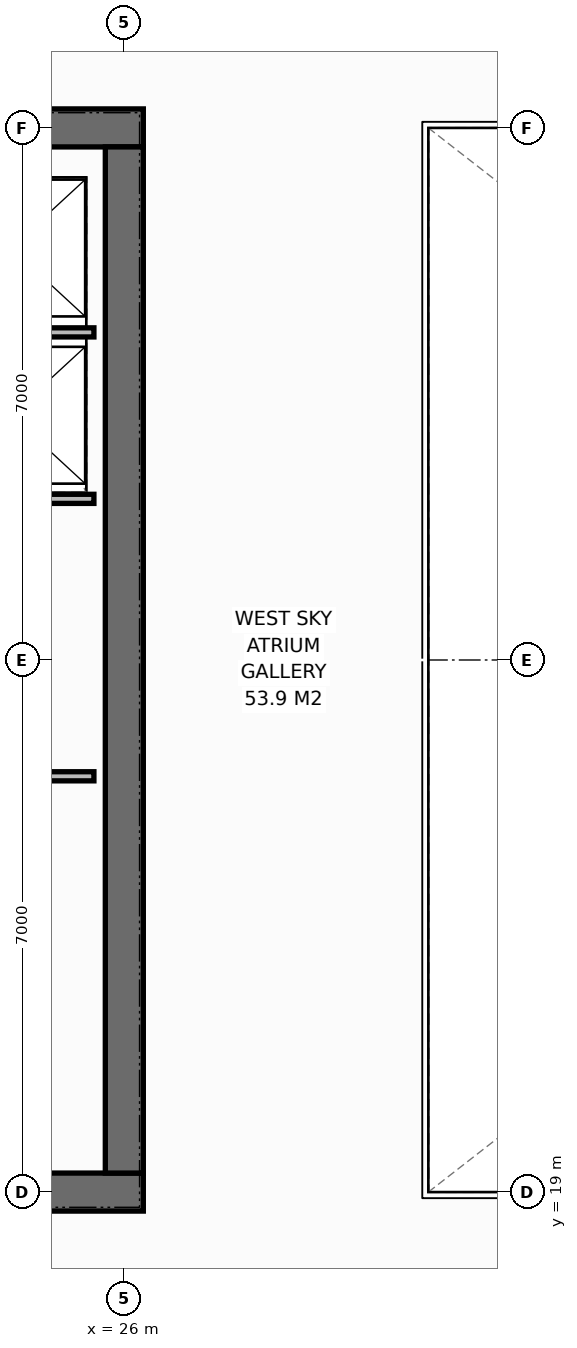
"""IFC4 building model, lengths in metres.
Left out: names, types, materials, properties, quantities, classifications, styles, units other than length and angle.
Written with IfcOpenShell. Run it as: python <this file> out.ifc"""

import sys

from ifc_helpers import new_model, si_unit, direction, frame, frame_2d, origin, place, context, subcontext, project, spatial, rectangle, extrude, element, save


model = new_model("IFC4")
c1 = context("Model", 3, precision=1e-05, world=origin(), true_north=direction((0.0, 1.0)))
c2 = subcontext(c1, "Body", "Model", "MODEL_VIEW")
j1 = project(units=[si_unit("LENGTHUNIT", "METRE"), si_unit("PLANEANGLEUNIT", "RADIAN")], contexts=[c1])
p1 = place(None, origin())
s1 = spatial("IfcSite", under=j1, at=p1, CompositionType="ELEMENT")
p2 = place(p1, origin())
s2 = spatial("IfcBuilding", under=s1, at=p2, CompositionType="ELEMENT")
p3 = place(p2, frame((0.0, 0.0, 259.4)))
s3 = spatial("IfcBuildingStorey", under=s2, at=p3, CompositionType="ELEMENT", Elevation=259.4)
p4 = place(p3, frame((12.75, 19.0, 0.0), z_axis=(0.0, 0.0, 1.0), x_axis=(1.0, 0.0, 0.0)))
e1 = element("IfcWall", 1, at=p4, inside=s3, PredefinedType="SHEAR", context=c2, shape_type="SweptSolid", body=[
    extrude(rectangle(XDim=13.5, YDim=0.5, at=frame_2d((6.75, 0.0))), origin(), (0.0, 0.0, 1.0), 3.8),
])
p5 = place(p4, frame((9.13, 0.0, 0.0)))
e2 = element("IfcOpeningElement", 2, at=p5, cuts=e1, PredefinedType="OPENING", context=c2, shape_type="SweptSolid", body=[
    extrude(rectangle(XDim=1.4, YDim=2.2, at=frame_2d((0.7, 1.1))), frame((0.0, 0.26, 0.0), z_axis=(0.0, -1.0, 0.0), x_axis=(1.0, 0.0, 0.0)), (0.0, 0.0, 1.0), 0.52),
])
p6 = place(p3, frame((12.75, 33.0, 0.0), z_axis=(0.0, 0.0, 1.0), x_axis=(1.0, 0.0, 0.0)))
e3 = element("IfcWall", 3, at=p6, inside=s3, PredefinedType="SHEAR", context=c2, shape_type="SweptSolid", body=[
    extrude(rectangle(XDim=13.5, YDim=0.5, at=frame_2d((6.75, 0.0))), origin(), (0.0, 0.0, 1.0), 3.8),
])
p7 = place(p6, frame((1.15, 0.0, 0.0)))
e4 = element("IfcOpeningElement", 4, at=p7, cuts=e3, PredefinedType="OPENING", context=c2, shape_type="SweptSolid", body=[
    extrude(rectangle(XDim=0.9, YDim=2.15, at=frame_2d((0.45, 1.075))), frame((0.0, 0.26, 0.0), z_axis=(0.0, -1.0, 0.0), x_axis=(1.0, 0.0, 0.0)), (0.0, 0.0, 1.0), 0.52),
])
p8 = place(p6, frame((3.75, 0.0, 0.0)))
e5 = element("IfcOpeningElement", 5, at=p8, cuts=e3, PredefinedType="OPENING", context=c2, shape_type="SweptSolid", body=[
    extrude(rectangle(XDim=0.95, YDim=2.15, at=frame_2d((0.475, 1.075))), frame((0.0, 0.26, 0.0), z_axis=(0.0, -1.0, 0.0), x_axis=(1.0, 0.0, 0.0)), (0.0, 0.0, 1.0), 0.52),
])
p9 = place(p6, frame((6.75, 0.0, 0.0)))
e6 = element("IfcOpeningElement", 6, at=p9, cuts=e3, PredefinedType="OPENING", context=c2, shape_type="SweptSolid", body=[
    extrude(rectangle(XDim=0.95, YDim=2.15, at=frame_2d((0.475, 1.075))), frame((0.0, 0.26, 0.0), z_axis=(0.0, -1.0, 0.0), x_axis=(1.0, 0.0, 0.0)), (0.0, 0.0, 1.0), 0.52),
])
p10 = place(p6, frame((9.13, 0.0, 0.0)))
e7 = element("IfcOpeningElement", 7, at=p10, cuts=e3, PredefinedType="OPENING", context=c2, shape_type="SweptSolid", body=[
    extrude(rectangle(XDim=1.4, YDim=2.2, at=frame_2d((0.7, 1.1))), frame((0.0, 0.26, 0.0), z_axis=(0.0, -1.0, 0.0), x_axis=(1.0, 0.0, 0.0)), (0.0, 0.0, 1.0), 0.52),
])
p11 = place(p3, frame((26.0, 19.25, 0.0), z_axis=(0.0, 0.0, 1.0), x_axis=(0.0, 1.0, 0.0)))
e8 = element("IfcWall", 8, at=p11, inside=s3, PredefinedType="SHEAR", context=c2, shape_type="SweptSolid", body=[
    extrude(rectangle(XDim=13.5, YDim=0.5, at=frame_2d((6.75, 0.0))), origin(), (0.0, 0.0, 1.0), 3.8),
])
for number, where, z_axis, x_axis in (
    (9, (23.4, 24.47, 0.0), (0.0, 0.0, 1.0), (1.0, 0.0, 0.0)),
    (10, (23.4, 28.12, 0.0), (0.0, 0.0, 1.0), (1.0, 0.0, 0.0)),
    (11, (23.4, 30.31, 0.0), (0.0, 0.0, 1.0), (1.0, 0.0, 0.0)),
):
    element("IfcWall", number, at=place(p3, frame(where, z_axis=z_axis, x_axis=x_axis)), inside=s3, PredefinedType="PARTITIONING", context=c2, shape_type="SweptSolid", body=[
        extrude(rectangle(XDim=2.2, YDim=0.12, at=frame_2d((1.1, 0.0))), origin(), (0.0, 0.0, 1.0), 3.588),
    ])
save(model, sys.argv[1])
